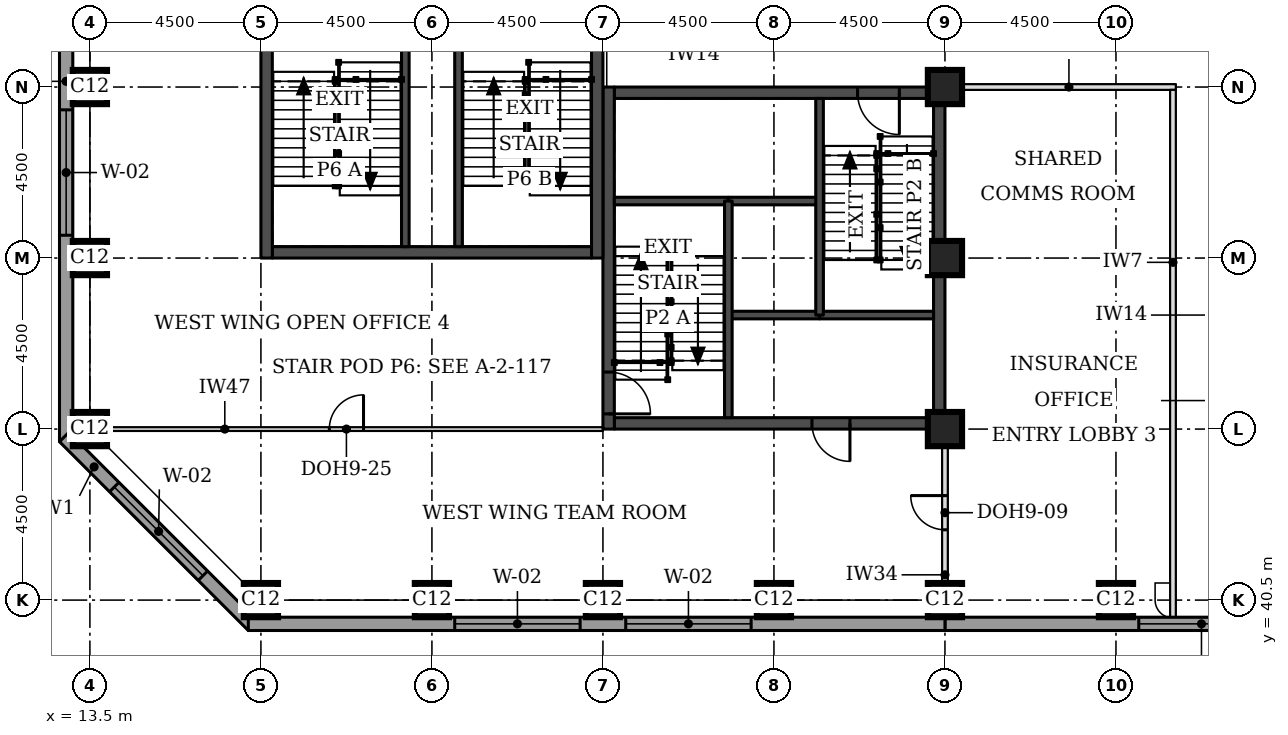
"""IFC4 building model, lengths in metres.
Left out: names, types, materials, properties, quantities, classifications, styles, units other than length and angle.
Written with IfcOpenShell. Run it as: python <this file> out.ifc"""

import sys

from ifc_helpers import new_model, si_unit, direction, frame, frame_2d, origin, origin_2d, place, context, subcontext, project, spatial, rectangle, extrude, element, fill, save


model = new_model("IFC4")
c1 = context("Model", 3, precision=1e-05, world=origin(), true_north=direction((0.0, 1.0)))
c2 = subcontext(c1, "Body", "Model", "MODEL_VIEW")
j1 = project(units=[si_unit("LENGTHUNIT", "METRE"), si_unit("PLANEANGLEUNIT", "RADIAN")], contexts=[c1])
p1 = place(None, origin())
s1 = spatial("IfcSite", under=j1, at=p1, CompositionType="ELEMENT")
p2 = place(p1, origin())
s2 = spatial("IfcBuilding", under=s1, at=p2, CompositionType="ELEMENT")
p3 = place(p2, frame((0.0, 0.0, 211.9)))
s3 = spatial("IfcBuildingStorey", under=s2, at=p3, CompositionType="ELEMENT", Elevation=211.9)
for number, where, z_axis, x_axis in (
    (1, (18.0, 40.5, 0.0), (0.0, 0.0, 1.0), (1.0, 0.0, 0.0)),
    (2, (22.5, 40.5, 0.0), (0.0, 0.0, 1.0), (1.0, 0.0, 0.0)),
    (3, (27.0, 40.5, 0.0), (0.0, 0.0, 1.0), (1.0, 0.0, 0.0)),
    (4, (31.5, 40.5, 0.0), (0.0, 0.0, 1.0), (1.0, 0.0, 0.0)),
    (5, (36.0, 40.5, 0.0), (0.0, 0.0, 1.0), (1.0, 0.0, 0.0)),
    (6, (40.5, 40.5, 0.0), (0.0, 0.0, 1.0), (1.0, 0.0, 0.0)),
    (7, (13.5, 45.0, 0.0), (0.0, 0.0, 1.0), (1.0, 0.0, 0.0)),
    (8, (36.0, 45.0, 0.0), (0.0, 0.0, 1.0), (1.0, 0.0, 0.0)),
    (9, (13.5, 49.5, 0.0), (0.0, 0.0, 1.0), (1.0, 0.0, 0.0)),
    (10, (36.0, 49.5, 0.0), (0.0, 0.0, 1.0), (1.0, 0.0, 0.0)),
    (11, (13.5, 54.0, 0.0), (0.0, 0.0, 1.0), (1.0, 0.0, 0.0)),
    (12, (36.0, 54.0, 0.0), (0.0, 0.0, 1.0), (1.0, 0.0, 0.0)),
):
    element("IfcColumn", number, at=place(p3, frame(where, z_axis=z_axis, x_axis=x_axis)), inside=s3, PredefinedType="COLUMN", context=c2, shape_type="SweptSolid", body=[
        extrude(rectangle(XDim=0.9, YDim=0.9, at=origin_2d()), origin(), (0.0, 0.0, 1.0), 3.7),
    ])
p4 = place(p3, frame((27.3, 45.15, 0.0), z_axis=(0.0, 0.0, 1.0), x_axis=(1.0, 0.0, 0.0)))
e13 = element("IfcWall", 13, at=p4, inside=s3, PredefinedType="SHEAR", context=c2, shape_type="SweptSolid", body=[
    extrude(rectangle(XDim=8.4, YDim=0.3, at=frame_2d((4.2, 0.0))), origin(), (0.0, 0.0, 1.0), 3.7),
])
p5 = place(p4, frame((5.2, 0.0, 0.0)))
e14 = element("IfcOpeningElement", 14, at=p5, cuts=e13, PredefinedType="OPENING", context=c2, shape_type="SweptSolid", body=[
    extrude(rectangle(XDim=1.0, YDim=2.1, at=frame_2d((0.5, 1.05))), frame((0.0, 0.16, 0.0), z_axis=(0.0, -1.0, 0.0), x_axis=(1.0, 0.0, 0.0)), (0.0, 0.0, 1.0), 0.32),
])
p6 = place(p3, frame((27.3, 53.85, 0.0), z_axis=(0.0, 0.0, 1.0), x_axis=(1.0, 0.0, 0.0)))
e15 = element("IfcWall", 15, at=p6, inside=s3, PredefinedType="SHEAR", context=c2, shape_type="SweptSolid", body=[
    extrude(rectangle(XDim=8.4, YDim=0.3, at=frame_2d((4.2, 0.0))), origin(), (0.0, 0.0, 1.0), 3.7),
])
p7 = place(p6, frame((6.4, 0.0, 0.0)))
e16 = element("IfcOpeningElement", 16, at=p7, cuts=e15, PredefinedType="OPENING", context=c2, shape_type="SweptSolid", body=[
    extrude(rectangle(XDim=1.1, YDim=2.1, at=frame_2d((0.55, 1.05))), frame((0.0, 0.16, 0.0), z_axis=(0.0, -1.0, 0.0), x_axis=(1.0, 0.0, 0.0)), (0.0, 0.0, 1.0), 0.32),
])
p8 = place(p3, frame((27.15, 45.0, 0.0), z_axis=(0.0, 0.0, 1.0), x_axis=(0.0, 1.0, 0.0)))
e17 = element("IfcWall", 17, at=p8, inside=s3, PredefinedType="SHEAR", context=c2, shape_type="SweptSolid", body=[
    extrude(rectangle(XDim=9.0, YDim=0.3, at=frame_2d((4.5, 0.0))), origin(), (0.0, 0.0, 1.0), 3.7),
])
p9 = place(p8, frame((0.4, 0.0, 0.0)))
e18 = element("IfcOpeningElement", 18, at=p9, cuts=e17, PredefinedType="OPENING", context=c2, shape_type="SweptSolid", body=[
    extrude(rectangle(XDim=1.1, YDim=2.1, at=frame_2d((0.55, 1.05))), frame((0.0, 0.16, 0.0), z_axis=(0.0, -1.0, 0.0), x_axis=(1.0, 0.0, 0.0)), (0.0, 0.0, 1.0), 0.32),
])
p10 = place(p3, frame((35.85, 45.0, 0.0), z_axis=(0.0, 0.0, 1.0), x_axis=(0.0, 1.0, 0.0)))
e19 = element("IfcWall", 19, at=p10, inside=s3, PredefinedType="SHEAR", context=c2, shape_type="SweptSolid", body=[
    extrude(rectangle(XDim=9.0, YDim=0.3, at=frame_2d((4.5, 0.0))), origin(), (0.0, 0.0, 1.0), 3.7),
])
p11 = place(p3, frame((18.3, 49.65, 0.0), z_axis=(0.0, 0.0, 1.0), x_axis=(1.0, 0.0, 0.0)))
e20 = element("IfcWall", 20, at=p11, inside=s3, PredefinedType="SHEAR", context=c2, shape_type="SweptSolid", body=[
    extrude(rectangle(XDim=8.4, YDim=0.3, at=frame_2d((4.2, 0.0))), origin(), (0.0, 0.0, 1.0), 3.7),
])
p12 = place(p3, frame((18.15, 49.5, 0.0), z_axis=(0.0, 0.0, 1.0), x_axis=(0.0, 1.0, 0.0)))
e21 = element("IfcWall", 21, at=p12, inside=s3, PredefinedType="SHEAR", context=c2, shape_type="SweptSolid", body=[
    extrude(rectangle(XDim=9.0, YDim=0.3, at=frame_2d((4.5, 0.0))), origin(), (0.0, 0.0, 1.0), 3.7),
])
p13 = place(p3, frame((26.85, 49.5, 0.0), z_axis=(0.0, 0.0, 1.0), x_axis=(0.0, 1.0, 0.0)))
e22 = element("IfcWall", 22, at=p13, inside=s3, PredefinedType="SHEAR", context=c2, shape_type="SweptSolid", body=[
    extrude(rectangle(XDim=9.0, YDim=0.3, at=frame_2d((4.5, 0.0))), origin(), (0.0, 0.0, 1.0), 3.7),
])
p14 = place(p13, frame((6.6, 0.0, 0.0)))
e23 = element("IfcOpeningElement", 23, at=p14, cuts=e22, PredefinedType="OPENING", context=c2, shape_type="SweptSolid", body=[
    extrude(rectangle(XDim=1.8, YDim=2.1, at=frame_2d((0.9, 1.05))), frame((0.0, 0.16, 0.0), z_axis=(0.0, -1.0, 0.0), x_axis=(1.0, 0.0, 0.0)), (0.0, 0.0, 1.0), 0.32),
])
p15 = place(p3, frame((36.0, 39.875, 0.0), z_axis=(0.0, 0.0, 1.0), x_axis=(1.0, 0.0, 0.0)))
e24 = element("IfcWall", 24, at=p15, inside=s3, PredefinedType="STANDARD", context=c2, shape_type="SweptSolid", body=[
    extrude(rectangle(XDim=36.331, YDim=0.35, at=frame_2d((18.166, 0.0))), origin(), (0.0, 0.0, 1.0), 3.525),
])
p16 = place(p15, frame((5.1, 0.0, 0.9)))
e25 = element("IfcOpeningElement", 25, at=p16, cuts=e24, PredefinedType="OPENING", context=c2, shape_type="SweptSolid", body=[
    extrude(rectangle(XDim=3.3, YDim=1.9, at=frame_2d((1.65, 0.95))), frame((0.0, 0.185, 0.0), z_axis=(0.0, -1.0, 0.0), x_axis=(1.0, 0.0, 0.0)), (0.0, 0.0, 1.0), 0.37),
])
p17 = place(p15, frame((9.6, 0.0, 0.9)))
e26 = element("IfcOpeningElement", 26, at=p17, cuts=e24, PredefinedType="OPENING", context=c2, shape_type="SweptSolid", body=[
    extrude(rectangle(XDim=3.3, YDim=1.9, at=frame_2d((1.65, 0.95))), frame((0.0, 0.185, 0.0), z_axis=(0.0, -1.0, 0.0), x_axis=(1.0, 0.0, 0.0)), (0.0, 0.0, 1.0), 0.37),
])
p18 = place(p15, frame((14.1, 0.0, 0.9)))
e27 = element("IfcOpeningElement", 27, at=p18, cuts=e24, PredefinedType="OPENING", context=c2, shape_type="SweptSolid", body=[
    extrude(rectangle(XDim=3.3, YDim=1.9, at=frame_2d((1.65, 0.95))), frame((0.0, 0.185, 0.0), z_axis=(0.0, -1.0, 0.0), x_axis=(1.0, 0.0, 0.0)), (0.0, 0.0, 1.0), 0.37),
])
p19 = place(p15, frame((18.6, 0.0, 0.9)))
e28 = element("IfcOpeningElement", 28, at=p19, cuts=e24, PredefinedType="OPENING", context=c2, shape_type="SweptSolid", body=[
    extrude(rectangle(XDim=3.3, YDim=1.9, at=frame_2d((1.65, 0.95))), frame((0.0, 0.185, 0.0), z_axis=(0.0, -1.0, 0.0), x_axis=(1.0, 0.0, 0.0)), (0.0, 0.0, 1.0), 0.37),
])
p20 = place(p15, frame((23.1, 0.0, 0.9)))
e29 = element("IfcOpeningElement", 29, at=p20, cuts=e24, PredefinedType="OPENING", context=c2, shape_type="SweptSolid", body=[
    extrude(rectangle(XDim=3.3, YDim=1.9, at=frame_2d((1.65, 0.95))), frame((0.0, 0.185, 0.0), z_axis=(0.0, -1.0, 0.0), x_axis=(1.0, 0.0, 0.0)), (0.0, 0.0, 1.0), 0.37),
])
p21 = place(p15, frame((27.6, 0.0, 0.9)))
e30 = element("IfcOpeningElement", 30, at=p21, cuts=e24, PredefinedType="OPENING", context=c2, shape_type="SweptSolid", body=[
    extrude(rectangle(XDim=3.3, YDim=1.9, at=frame_2d((1.65, 0.95))), frame((0.0, 0.185, 0.0), z_axis=(0.0, -1.0, 0.0), x_axis=(1.0, 0.0, 0.0)), (0.0, 0.0, 1.0), 0.37),
])
p22 = place(p3, frame((12.875, 58.831, 0.0), z_axis=(0.0, 0.0, 1.0), x_axis=(0.0, -1.0, 0.0)))
e31 = element("IfcWall", 31, at=p22, inside=s3, PredefinedType="STANDARD", context=c2, shape_type="SweptSolid", body=[
    extrude(rectangle(XDim=14.163, YDim=0.35, at=frame_2d((7.081, 0.0))), origin(), (0.0, 0.0, 1.0), 3.525),
])
p23 = place(p22, frame((5.431, 0.0, 0.9)))
e32 = element("IfcOpeningElement", 32, at=p23, cuts=e31, PredefinedType="OPENING", context=c2, shape_type="SweptSolid", body=[
    extrude(rectangle(XDim=3.3, YDim=1.9, at=frame_2d((1.65, 0.95))), frame((0.0, 0.185, 0.0), z_axis=(0.0, -1.0, 0.0), x_axis=(1.0, 0.0, 0.0)), (0.0, 0.0, 1.0), 0.37),
])
p24 = place(p3, frame((12.824, 44.792, 0.0), z_axis=(0.0, 0.0, 1.0), x_axis=(0.707106781187, -0.707106781187, 0.0)))
e33 = element("IfcWall", 33, at=p24, inside=s3, PredefinedType="STANDARD", context=c2, shape_type="SweptSolid", body=[
    extrude(rectangle(XDim=7.027, YDim=0.35, at=frame_2d((3.513, 0.0))), origin(), (0.0, 0.0, 1.0), 3.525),
])
p25 = place(p24, frame((1.863, 0.0, 0.9)))
e34 = element("IfcOpeningElement", 34, at=p25, cuts=e33, PredefinedType="OPENING", context=c2, shape_type="SweptSolid", body=[
    extrude(rectangle(XDim=3.3, YDim=1.9, at=frame_2d((1.65, 0.95))), frame((0.0, 0.185, 0.0), z_axis=(0.0, -1.0, 0.0), x_axis=(1.0, 0.0, 0.0)), (0.0, 0.0, 1.0), 0.37),
])
p26 = place(p3, frame((17.669, 39.875, 0.0), z_axis=(0.0, 0.0, 1.0), x_axis=(1.0, 0.0, 0.0)))
e35 = element("IfcWall", 35, at=p26, inside=s3, PredefinedType="STANDARD", context=c2, shape_type="SweptSolid", body=[
    extrude(rectangle(XDim=18.331, YDim=0.35, at=frame_2d((9.166, 0.0))), origin(), (0.0, 0.0, 1.0), 3.525),
])
p27 = place(p26, frame((5.431, 0.0, 0.9)))
e36 = element("IfcOpeningElement", 36, at=p27, cuts=e35, PredefinedType="OPENING", context=c2, shape_type="SweptSolid", body=[
    extrude(rectangle(XDim=3.3, YDim=1.9, at=frame_2d((1.65, 0.95))), frame((0.0, 0.185, 0.0), z_axis=(0.0, -1.0, 0.0), x_axis=(1.0, 0.0, 0.0)), (0.0, 0.0, 1.0), 0.37),
])
p28 = place(p26, frame((9.931, 0.0, 0.9)))
e37 = element("IfcOpeningElement", 37, at=p28, cuts=e35, PredefinedType="OPENING", context=c2, shape_type="SweptSolid", body=[
    extrude(rectangle(XDim=3.3, YDim=1.9, at=frame_2d((1.65, 0.95))), frame((0.0, 0.185, 0.0), z_axis=(0.0, -1.0, 0.0), x_axis=(1.0, 0.0, 0.0)), (0.0, 0.0, 1.0), 0.37),
])
p29 = place(p3, frame((36.45, 54.0, 0.0), z_axis=(0.0, 0.0, 1.0), x_axis=(1.0, 0.0, 0.0)))
e38 = element("IfcWall", 38, at=p29, inside=s3, PredefinedType="PARTITIONING", context=c2, shape_type="SweptSolid", body=[
    extrude(rectangle(XDim=5.625, YDim=0.15, at=frame_2d((2.812, 0.0))), origin(), (0.0, 0.0, 1.0), 3.55),
])
p30 = place(p3, frame((42.0, 40.05, 0.0), z_axis=(0.0, 0.0, 1.0), x_axis=(0.0, 1.0, 0.0)))
e39 = element("IfcWall", 39, at=p30, inside=s3, PredefinedType="PARTITIONING", context=c2, shape_type="SweptSolid", body=[
    extrude(rectangle(XDim=13.875, YDim=0.15, at=frame_2d((6.938, 0.0))), origin(), (0.0, 0.0, 1.0), 3.55),
])
p31 = place(p3, frame((36.0, 40.95, 0.0), z_axis=(0.0, 0.0, 1.0), x_axis=(0.0, 1.0, 0.0)))
e40 = element("IfcWall", 40, at=p31, inside=s3, PredefinedType="PARTITIONING", context=c2, shape_type="SweptSolid", body=[
    extrude(rectangle(XDim=3.63, YDim=0.15, at=frame_2d((1.815, 0.0))), origin(), (0.0, 0.0, 1.0), 2.8),
])
p32 = place(p31, frame((1.4, 0.0, 0.0)))
e41 = element("IfcOpeningElement", 41, at=p32, cuts=e40, PredefinedType="OPENING", context=c2, shape_type="SweptSolid", body=[
    extrude(rectangle(XDim=0.9, YDim=2.1, at=frame_2d((0.45, 1.05))), frame((0.0, 0.085, 0.0), z_axis=(0.0, -1.0, 0.0), x_axis=(1.0, 0.0, 0.0)), (0.0, 0.0, 1.0), 0.17),
])
p33 = place(p3, frame((13.5, 45.0, 0.0), z_axis=(0.0, 0.0, 1.0), x_axis=(1.0, 0.0, 0.0)))
e42 = element("IfcWall", 42, at=p33, inside=s3, PredefinedType="PARTITIONING", context=c2, shape_type="SweptSolid", body=[
    extrude(rectangle(XDim=13.5, YDim=0.1, at=frame_2d((6.75, 0.0))), origin(), (0.0, 0.0, 1.0), 2.55),
])
p34 = place(p33, frame((6.3, 0.0, 0.0)))
e43 = element("IfcOpeningElement", 43, at=p34, cuts=e42, PredefinedType="OPENING", context=c2, shape_type="SweptSolid", body=[
    extrude(rectangle(XDim=0.9, YDim=2.1, at=frame_2d((0.45, 1.05))), frame((0.0, 0.06, 0.0), z_axis=(0.0, -1.0, 0.0), x_axis=(1.0, 0.0, 0.0)), (0.0, 0.0, 1.0), 0.12),
])
p35 = place(p3, frame((30.3, 48.0, 0.0), z_axis=(0.0, 0.0, 1.0), x_axis=(1.0, 0.0, 0.0)))
e44 = element("IfcWall", 44, at=p35, inside=s3, PredefinedType="SOLIDWALL", context=c2, shape_type="SweptSolid", body=[
    extrude(rectangle(XDim=2.4, YDim=0.2, at=frame_2d((1.2, 0.0))), origin(), (0.0, 0.0, 1.0), 3.55),
])
p36 = place(p3, frame((32.7, 48.0, 0.0), z_axis=(0.0, 0.0, 1.0), x_axis=(1.0, 0.0, 0.0)))
e45 = element("IfcWall", 45, at=p36, inside=s3, PredefinedType="SOLIDWALL", context=c2, shape_type="SweptSolid", body=[
    extrude(rectangle(XDim=3.0, YDim=0.2, at=frame_2d((1.5, 0.0))), origin(), (0.0, 0.0, 1.0), 3.55),
])
p37 = place(p3, frame((30.3, 51.0, 0.0), z_axis=(0.0, 0.0, 1.0), x_axis=(1.0, 0.0, 0.0)))
e46 = element("IfcWall", 46, at=p37, inside=s3, PredefinedType="SOLIDWALL", context=c2, shape_type="SweptSolid", body=[
    extrude(rectangle(XDim=2.4, YDim=0.2, at=frame_2d((1.2, 0.0))), origin(), (0.0, 0.0, 1.0), 3.7),
])
p38 = place(p3, frame((27.3, 51.0, 0.0), z_axis=(0.0, 0.0, 1.0), x_axis=(1.0, 0.0, 0.0)))
e47 = element("IfcWall", 47, at=p38, inside=s3, PredefinedType="SOLIDWALL", context=c2, shape_type="SweptSolid", body=[
    extrude(rectangle(XDim=3.0, YDim=0.2, at=frame_2d((1.5, 0.0))), origin(), (0.0, 0.0, 1.0), 3.55),
])
for number, where, z_axis, x_axis in (
    (48, (30.3, 45.3, 0.0), (0.0, 0.0, 1.0), (0.0, 1.0, 0.0)),
    (49, (32.7, 48.0, 0.0), (0.0, 0.0, 1.0), (0.0, 1.0, 0.0)),
):
    element("IfcWall", number, at=place(p3, frame(where, z_axis=z_axis, x_axis=x_axis)), inside=s3, PredefinedType="SOLIDWALL", context=c2, shape_type="SweptSolid", body=[
        extrude(rectangle(XDim=5.7, YDim=0.2, at=frame_2d((2.85, 0.0))), origin(), (0.0, 0.0, 1.0), 3.55),
    ])
for number, where, z_axis, x_axis in (
    (50, (21.8, 49.8, 0.0), (0.0, 0.0, 1.0), (0.0, 1.0, 0.0)),
    (51, (23.2, 49.8, 0.0), (0.0, 0.0, 1.0), (0.0, 1.0, 0.0)),
):
    element("IfcWall", number, at=place(p3, frame(where, z_axis=z_axis, x_axis=x_axis)), inside=s3, PredefinedType="SOLIDWALL", context=c2, shape_type="SweptSolid", body=[
        extrude(rectangle(XDim=6.05, YDim=0.2, at=frame_2d((3.025, 0.0))), origin(), (0.0, 0.0, 1.0), 3.55),
    ])
p39 = place(p16, origin())
e52 = element("IfcWindow", 52, at=p39, inside=s3, PartitioningType="SINGLE_PANEL", PredefinedType="WINDOW", context=c2, shape_type="SweptSolid", body=[
    extrude(rectangle(XDim=3.3, YDim=1.9, at=frame_2d((1.65, 0.95))), frame((0.0, 0.085, 0.0), z_axis=(0.0, -1.0, 0.0), x_axis=(1.0, 0.0, 0.0)), (0.0, 0.0, 1.0), 0.06),
])
fill(e25, e52)
p40 = place(p23, origin())
e53 = element("IfcWindow", 53, at=p40, inside=s3, PartitioningType="SINGLE_PANEL", PredefinedType="WINDOW", context=c2, shape_type="SweptSolid", body=[
    extrude(rectangle(XDim=3.3, YDim=1.9, at=frame_2d((1.65, 0.95))), frame((0.0, 0.085, 0.0), z_axis=(0.0, -1.0, 0.0), x_axis=(1.0, 0.0, 0.0)), (0.0, 0.0, 1.0), 0.06),
])
fill(e32, e53)
p41 = place(p25, origin())
e54 = element("IfcWindow", 54, at=p41, inside=s3, PartitioningType="SINGLE_PANEL", PredefinedType="WINDOW", context=c2, shape_type="SweptSolid", body=[
    extrude(rectangle(XDim=3.3, YDim=1.9, at=frame_2d((1.65, 0.95))), frame((0.0, 0.085, 0.0), z_axis=(0.0, -1.0, 0.0), x_axis=(1.0, 0.0, 0.0)), (0.0, 0.0, 1.0), 0.06),
])
fill(e34, e54)
p42 = place(p27, origin())
e55 = element("IfcWindow", 55, at=p42, inside=s3, PartitioningType="SINGLE_PANEL", PredefinedType="WINDOW", context=c2, shape_type="SweptSolid", body=[
    extrude(rectangle(XDim=3.3, YDim=1.9, at=frame_2d((1.65, 0.95))), frame((0.0, 0.085, 0.0), z_axis=(0.0, -1.0, 0.0), x_axis=(1.0, 0.0, 0.0)), (0.0, 0.0, 1.0), 0.06),
])
fill(e36, e55)
p43 = place(p28, origin())
e56 = element("IfcWindow", 56, at=p43, inside=s3, PartitioningType="SINGLE_PANEL", PredefinedType="WINDOW", context=c2, shape_type="SweptSolid", body=[
    extrude(rectangle(XDim=3.3, YDim=1.9, at=frame_2d((1.65, 0.95))), frame((0.0, 0.085, 0.0), z_axis=(0.0, -1.0, 0.0), x_axis=(1.0, 0.0, 0.0)), (0.0, 0.0, 1.0), 0.06),
])
fill(e37, e56)
p44 = place(p32, origin())
e57 = element("IfcDoor", 57, at=p44, inside=s3, OperationType="SINGLE_SWING_RIGHT", PredefinedType="DOOR", context=c2, shape_type="SweptSolid", body=[
    extrude(rectangle(XDim=0.9, YDim=2.1, at=frame_2d((0.45, 1.05))), frame((0.0, 0.025, 0.0), z_axis=(0.0, -1.0, 0.0), x_axis=(1.0, 0.0, 0.0)), (0.0, 0.0, 1.0), 0.05),
])
fill(e41, e57)
p45 = place(p34, origin())
e58 = element("IfcDoor", 58, at=p45, inside=s3, OperationType="SINGLE_SWING_RIGHT", PredefinedType="DOOR", context=c2, shape_type="SweptSolid", body=[
    extrude(rectangle(XDim=0.9, YDim=2.1, at=frame_2d((0.45, 1.05))), frame((0.0, 0.025, 0.0), z_axis=(0.0, -1.0, 0.0), x_axis=(1.0, 0.0, 0.0)), (0.0, 0.0, 1.0), 0.05),
])
fill(e43, e58)
p46 = place(p9, frame((1.1, 0.0, 0.0), z_axis=(0.0, 0.0, 1.0), x_axis=(-1.0, 0.0, 0.0)))
e59 = element("IfcDoor", 59, at=p46, inside=s3, OperationType="SINGLE_SWING_RIGHT", PredefinedType="DOOR", context=c2, shape_type="SweptSolid", body=[
    extrude(rectangle(XDim=1.1, YDim=2.1, at=frame_2d((0.55, 1.05))), frame((0.0, 0.025, 0.0), z_axis=(0.0, -1.0, 0.0), x_axis=(1.0, 0.0, 0.0)), (0.0, 0.0, 1.0), 0.05),
])
fill(e18, e59)
p47 = place(p7, frame((1.1, 0.0, 0.0), z_axis=(0.0, 0.0, 1.0), x_axis=(-1.0, 0.0, 0.0)))
e60 = element("IfcDoor", 60, at=p47, inside=s3, OperationType="SINGLE_SWING_LEFT", PredefinedType="DOOR", context=c2, shape_type="SweptSolid", body=[
    extrude(rectangle(XDim=1.1, YDim=2.1, at=frame_2d((0.55, 1.05))), frame((0.0, 0.025, 0.0), z_axis=(0.0, -1.0, 0.0), x_axis=(1.0, 0.0, 0.0)), (0.0, 0.0, 1.0), 0.05),
])
fill(e16, e60)
p48 = place(p5, frame((1.0, 0.0, 0.0), z_axis=(0.0, 0.0, 1.0), x_axis=(-1.0, 0.0, 0.0)))
e61 = element("IfcDoor", 61, at=p48, inside=s3, OperationType="SINGLE_SWING_LEFT", PredefinedType="DOOR", context=c2, shape_type="SweptSolid", body=[
    extrude(rectangle(XDim=1.0, YDim=2.1, at=frame_2d((0.5, 1.05))), frame((0.0, 0.025, 0.0), z_axis=(0.0, -1.0, 0.0), x_axis=(1.0, 0.0, 0.0)), (0.0, 0.0, 1.0), 0.05),
])
fill(e14, e61)
save(model, sys.argv[1])
